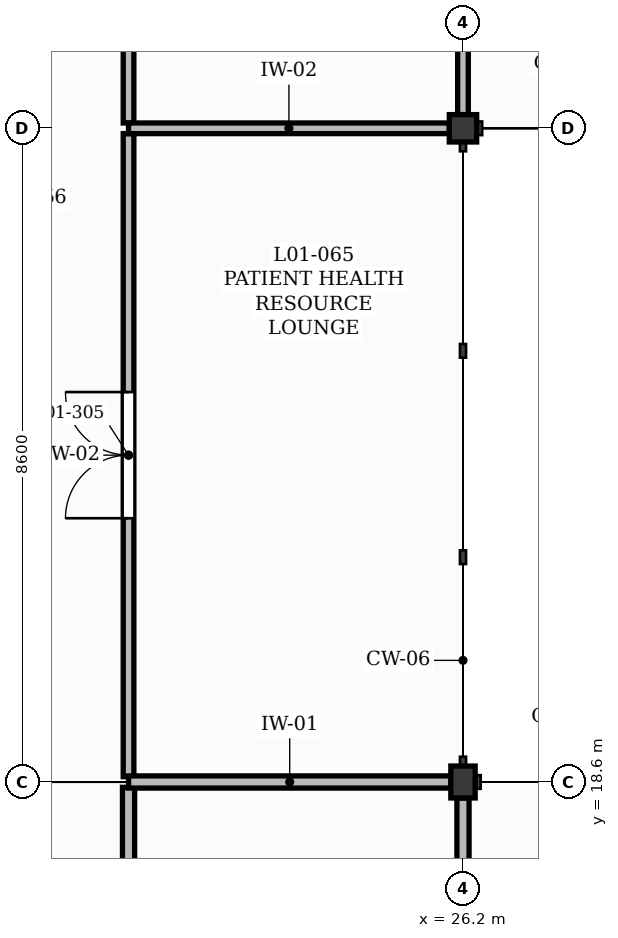
"""IFC4 building model, lengths in metres.
Left out: names, types, materials, properties, quantities, classifications, styles, units other than length and angle.
Written with IfcOpenShell. Run it as: python <this file> out.ifc"""

import sys

from ifc_helpers import new_model, si_unit, direction, frame, frame_2d, origin, origin_2d, place, context, subcontext, project, spatial, rectangle, extrude, element, fill, save


model = new_model("IFC4")
c1 = context("Model", 3, precision=1e-05, world=origin(), true_north=direction((0.0, 1.0)))
c2 = subcontext(c1, "Body", "Model", "MODEL_VIEW")
j1 = project(units=[si_unit("LENGTHUNIT", "METRE"), si_unit("PLANEANGLEUNIT", "RADIAN")], contexts=[c1])
p1 = place(None, origin())
s1 = spatial("IfcSite", under=j1, at=p1, CompositionType="ELEMENT")
p2 = place(p1, origin())
s2 = spatial("IfcBuilding", under=s1, at=p2, CompositionType="ELEMENT")
p3 = place(p2, frame((0.0, 0.0, 4.5)))
s3 = spatial("IfcBuildingStorey", under=s2, at=p3, CompositionType="ELEMENT", Elevation=4.5)
p4 = place(p3, frame((26.2, 18.6, 0.0), z_axis=(0.0, 0.0, 1.0), x_axis=(1.0, 0.0, 0.0)))
e1 = element("IfcColumn", 1, at=p4, inside=s3, PredefinedType="COLUMN", context=c2, shape_type="SweptSolid", body=[
    extrude(rectangle(XDim=0.32, YDim=0.42, at=origin_2d()), origin(), (0.0, 0.0, 1.0), 4.26),
])
p5 = place(p3, frame((26.2, 27.2, 0.0), z_axis=(0.0, 0.0, 1.0), x_axis=(1.0, 0.0, 0.0)))
e2 = element("IfcColumn", 2, at=p5, inside=s3, PredefinedType="COLUMN", context=c2, shape_type="SweptSolid", body=[
    extrude(rectangle(XDim=0.36, YDim=0.36, at=origin_2d()), origin(), (0.0, 0.0, 1.0), 4.26),
])
p6 = place(p3, frame((21.8, 13.47, 0.0), z_axis=(0.0, 0.0, 1.0), x_axis=(0.0, 1.0, 0.0)))
e3 = element("IfcWall", 3, at=p6, inside=s3, PredefinedType="PARTITIONING", context=c2, shape_type="SweptSolid", body=[
    extrude(rectangle(XDim=5.06, YDim=0.16, at=frame_2d((2.53, 0.0))), origin(), (0.0, 0.0, 1.0), 4.18),
])
p7 = place(p6, frame((1.96, 0.0, 0.0)))
e4 = element("IfcOpeningElement", 4, at=p7, cuts=e3, PredefinedType="OPENING", context=c2, shape_type="SweptSolid", body=[
    extrude(rectangle(XDim=1.14, YDim=2.15, at=frame_2d((0.57, 1.075))), frame((0.0, 0.09, 0.0), z_axis=(0.0, -1.0, 0.0), x_axis=(1.0, 0.0, 0.0)), (0.0, 0.0, 1.0), 0.18),
])
p8 = place(p3, frame((21.8, 18.67, 0.0), z_axis=(0.0, 0.0, 1.0), x_axis=(0.0, 1.0, 0.0)))
e5 = element("IfcWall", 5, at=p8, inside=s3, PredefinedType="PARTITIONING", context=c2, shape_type="SweptSolid", body=[
    extrude(rectangle(XDim=8.46, YDim=0.14, at=frame_2d((4.23, 0.0))), origin(), (0.0, 0.0, 1.0), 4.18),
])
p9 = place(p8, frame((3.4, 0.0, 0.0)))
e6 = element("IfcOpeningElement", 6, at=p9, cuts=e5, PredefinedType="OPENING", context=c2, shape_type="SweptSolid", body=[
    extrude(rectangle(XDim=1.66, YDim=2.3, at=frame_2d((0.83, 1.15))), frame((0.0, 0.08, 0.0), z_axis=(0.0, -1.0, 0.0), x_axis=(1.0, 0.0, 0.0)), (0.0, 0.0, 1.0), 0.16),
])
p10 = place(p3, frame((21.8, 18.6, 0.0), z_axis=(0.0, 0.0, 1.0), x_axis=(1.0, 0.0, 0.0)))
e7 = element("IfcWall", 7, at=p10, inside=s3, PredefinedType="PARTITIONING", context=c2, shape_type="SweptSolid", body=[
    extrude(rectangle(XDim=4.24, YDim=0.16, at=frame_2d((2.12, 0.0))), origin(), (0.0, 0.0, 1.0), 3.62),
])
p11 = place(p3, frame((21.8, 27.27, 0.0), z_axis=(0.0, 0.0, 1.0), x_axis=(0.0, 1.0, 0.0)))
e8 = element("IfcWall", 8, at=p11, inside=s3, PredefinedType="PARTITIONING", context=c2, shape_type="SweptSolid", body=[
    extrude(rectangle(XDim=9.46, YDim=0.14, at=frame_2d((4.73, 0.0))), origin(), (0.0, 0.0, 1.0), 4.18),
])
p12 = place(p11, frame((4.09, 0.0, 0.0)))
e9 = element("IfcOpeningElement", 9, at=p12, cuts=e8, PredefinedType="OPENING", context=c2, shape_type="SweptSolid", body=[
    extrude(rectangle(XDim=1.28, YDim=2.2, at=frame_2d((0.64, 1.1))), frame((0.0, 0.08, 0.0), z_axis=(0.0, -1.0, 0.0), x_axis=(1.0, 0.0, 0.0)), (0.0, 0.0, 1.0), 0.16),
])
p13 = place(p3, frame((21.8, 27.2, 0.0), z_axis=(0.0, 0.0, 1.0), x_axis=(1.0, 0.0, 0.0)))
e10 = element("IfcWall", 10, at=p13, inside=s3, PredefinedType="PARTITIONING", context=c2, shape_type="SweptSolid", body=[
    extrude(rectangle(XDim=4.22, YDim=0.14, at=frame_2d((2.11, 0.0))), origin(), (0.0, 0.0, 1.0), 3.66),
])
p14 = place(p3, frame((26.2, 13.47, 0.0), z_axis=(0.0, 0.0, 1.0), x_axis=(0.0, 1.0, 0.0)))
e11 = element("IfcWall", 11, at=p14, inside=s3, PredefinedType="PARTITIONING", context=c2, shape_type="SweptSolid", body=[
    extrude(rectangle(XDim=4.92, YDim=0.16, at=frame_2d((2.46, 0.0))), origin(), (0.0, 0.0, 1.0), 3.74),
])
p15 = place(p3, frame((26.2, 27.38, 0.0), z_axis=(0.0, 0.0, 1.0), x_axis=(0.0, 1.0, 0.0)))
e12 = element("IfcWall", 12, at=p15, inside=s3, PredefinedType="PARTITIONING", context=c2, shape_type="SweptSolid", body=[
    extrude(rectangle(XDim=9.24, YDim=0.14, at=frame_2d((4.62, 0.0))), origin(), (0.0, 0.0, 1.0), 3.97),
])
p16 = place(p15, frame((3.98, 0.0, 0.0)))
e13 = element("IfcOpeningElement", 13, at=p16, cuts=e12, PredefinedType="OPENING", context=c2, shape_type="SweptSolid", body=[
    extrude(rectangle(XDim=1.28, YDim=2.2, at=frame_2d((0.64, 1.1))), frame((0.0, 0.08, 0.0), z_axis=(0.0, -1.0, 0.0), x_axis=(1.0, 0.0, 0.0)), (0.0, 0.0, 1.0), 0.16),
])
p17 = place(p9, origin())
e14 = element("IfcDoor", 14, at=p17, inside=s3, OperationType="DOUBLE_DOOR_SINGLE_SWING", PredefinedType="DOOR", context=c2, shape_type="SweptSolid", body=[
    extrude(rectangle(XDim=1.66, YDim=2.3, at=frame_2d((0.83, 1.15))), frame((0.0, 0.025, 0.0), z_axis=(0.0, -1.0, 0.0), x_axis=(1.0, 0.0, 0.0)), (0.0, 0.0, 1.0), 0.05),
])
fill(e6, e14)
save(model, sys.argv[1])
